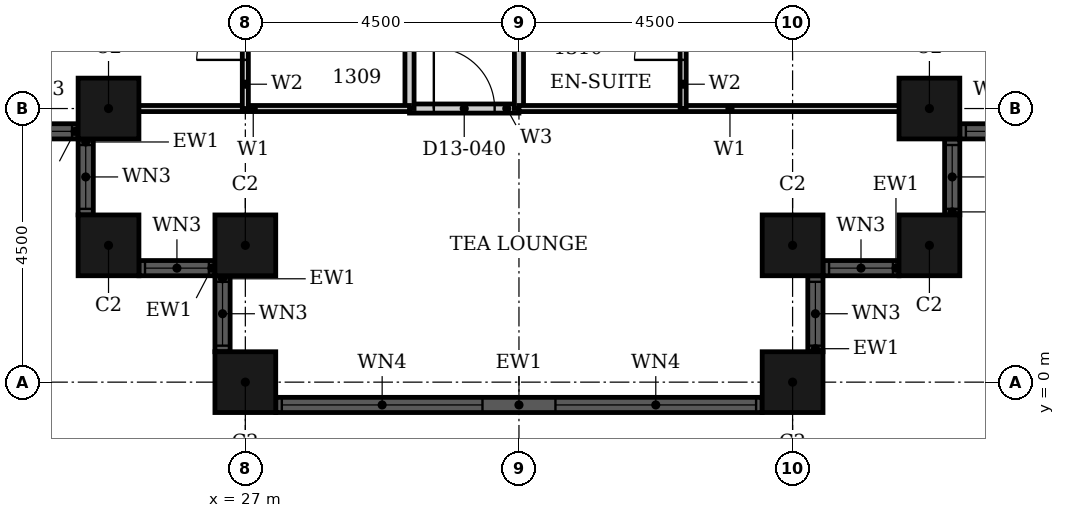
"""IFC4 building model, lengths in metres.
Left out: names, types, materials, properties, quantities, classifications, styles, units other than length and angle.
Written with IfcOpenShell. Run it as: python <this file> out.ifc"""

import sys

from ifc_helpers import new_model, si_unit, direction, frame, frame_2d, origin, origin_2d, place, context, subcontext, project, spatial, rectangle, hollow_rectangle, extrude, element, fill, save


model = new_model("IFC4")
c1 = context("Model", 3, precision=1e-05, world=origin(), true_north=direction((0.0, 1.0)))
c2 = subcontext(c1, "Body", "Model", "MODEL_VIEW")
j1 = project(units=[si_unit("LENGTHUNIT", "METRE"), si_unit("PLANEANGLEUNIT", "RADIAN")], contexts=[c1])
p1 = place(None, origin())
s1 = spatial("IfcSite", under=j1, at=p1, CompositionType="ELEMENT")
p2 = place(p1, origin())
s2 = spatial("IfcBuilding", under=s1, at=p2, CompositionType="ELEMENT")
p3 = place(p2, frame((0.0, 0.0, 60.0)))
s3 = spatial("IfcBuildingStorey", under=s2, at=p3, CompositionType="ELEMENT", Elevation=60.0)
for number, where, z_axis, x_axis in (
    (1, (24.75, 4.5, 0.0), (0.0, 0.0, 1.0), (1.0, 0.0, 0.0)),
    (2, (24.75, 2.25, 0.0), (0.0, 0.0, 1.0), (1.0, 0.0, 0.0)),
    (3, (27.0, 2.25, 0.0), (0.0, 0.0, 1.0), (1.0, 0.0, 0.0)),
    (4, (27.0, 0.0, 0.0), (0.0, 0.0, 1.0), (1.0, 0.0, 0.0)),
    (5, (36.0, 0.0, 0.0), (0.0, 0.0, 1.0), (1.0, 0.0, 0.0)),
    (6, (36.0, 2.25, 0.0), (0.0, 0.0, 1.0), (1.0, 0.0, 0.0)),
    (7, (38.25, 2.25, 0.0), (0.0, 0.0, 1.0), (1.0, 0.0, 0.0)),
    (8, (38.25, 4.5, 0.0), (0.0, 0.0, 1.0), (1.0, 0.0, 0.0)),
):
    element("IfcColumn", number, at=place(p3, frame(where, z_axis=z_axis, x_axis=x_axis)), inside=s3, PredefinedType="COLUMN", context=c2, shape_type="SweptSolid", body=[
        extrude(hollow_rectangle(XDim=1.0, YDim=1.0, WallThickness=0.032, at=origin_2d()), origin(), (0.0, 0.0, 1.0), 3.6),
    ])
p4 = place(p3, frame((23.0, 4.125, 0.0), z_axis=(0.0, 0.0, 1.0), x_axis=(1.0, 0.0, 0.0)))
e9 = element("IfcWall", 9, at=p4, inside=s3, PredefinedType="SOLIDWALL", context=c2, shape_type="SweptSolid", body=[
    extrude(rectangle(XDim=1.25, YDim=0.25, at=frame_2d((0.625, 0.0))), origin(), (0.0, 0.0, 1.0), 3.6),
])
p5 = place(p4, frame((0.1, 0.0, 0.9)))
e10 = element("IfcOpeningElement", 10, at=p5, cuts=e9, PredefinedType="OPENING", context=c2, shape_type="SweptSolid", body=[
    extrude(rectangle(XDim=1.05, YDim=2.08, at=frame_2d((0.525, 1.04))), frame((0.0, 0.135, 0.0), z_axis=(0.0, -1.0, 0.0), x_axis=(1.0, 0.0, 0.0)), (0.0, 0.0, 1.0), 0.27),
])
p6 = place(p3, frame((24.375, 4.0, 0.0), z_axis=(0.0, 0.0, 1.0), x_axis=(0.0, -1.0, 0.0)))
e11 = element("IfcWall", 11, at=p6, inside=s3, PredefinedType="SOLIDWALL", context=c2, shape_type="SweptSolid", body=[
    extrude(rectangle(XDim=1.25, YDim=0.25, at=frame_2d((0.625, 0.0))), origin(), (0.0, 0.0, 1.0), 3.6),
])
p7 = place(p6, frame((0.1, 0.0, 0.9)))
e12 = element("IfcOpeningElement", 12, at=p7, cuts=e11, PredefinedType="OPENING", context=c2, shape_type="SweptSolid", body=[
    extrude(rectangle(XDim=1.05, YDim=2.08, at=frame_2d((0.525, 1.04))), frame((0.0, 0.135, 0.0), z_axis=(0.0, -1.0, 0.0), x_axis=(1.0, 0.0, 0.0)), (0.0, 0.0, 1.0), 0.27),
])
p8 = place(p3, frame((25.25, 1.875, 0.0), z_axis=(0.0, 0.0, 1.0), x_axis=(1.0, 0.0, 0.0)))
e13 = element("IfcWall", 13, at=p8, inside=s3, PredefinedType="SOLIDWALL", context=c2, shape_type="SweptSolid", body=[
    extrude(rectangle(XDim=1.25, YDim=0.25, at=frame_2d((0.625, 0.0))), origin(), (0.0, 0.0, 1.0), 3.6),
])
p9 = place(p8, frame((0.1, 0.0, 0.9)))
e14 = element("IfcOpeningElement", 14, at=p9, cuts=e13, PredefinedType="OPENING", context=c2, shape_type="SweptSolid", body=[
    extrude(rectangle(XDim=1.05, YDim=2.08, at=frame_2d((0.525, 1.04))), frame((0.0, 0.135, 0.0), z_axis=(0.0, -1.0, 0.0), x_axis=(1.0, 0.0, 0.0)), (0.0, 0.0, 1.0), 0.27),
])
p10 = place(p3, frame((26.625, 1.75, 0.0), z_axis=(0.0, 0.0, 1.0), x_axis=(0.0, -1.0, 0.0)))
e15 = element("IfcWall", 15, at=p10, inside=s3, PredefinedType="SOLIDWALL", context=c2, shape_type="SweptSolid", body=[
    extrude(rectangle(XDim=1.25, YDim=0.25, at=frame_2d((0.625, 0.0))), origin(), (0.0, 0.0, 1.0), 3.6),
])
p11 = place(p10, frame((0.1, 0.0, 0.9)))
e16 = element("IfcOpeningElement", 16, at=p11, cuts=e15, PredefinedType="OPENING", context=c2, shape_type="SweptSolid", body=[
    extrude(rectangle(XDim=1.05, YDim=2.08, at=frame_2d((0.525, 1.04))), frame((0.0, 0.135, 0.0), z_axis=(0.0, -1.0, 0.0), x_axis=(1.0, 0.0, 0.0)), (0.0, 0.0, 1.0), 0.27),
])
p12 = place(p3, frame((27.5, -0.375, 0.0), z_axis=(0.0, 0.0, 1.0), x_axis=(1.0, 0.0, 0.0)))
e17 = element("IfcWall", 17, at=p12, inside=s3, PredefinedType="SOLIDWALL", context=c2, shape_type="SweptSolid", body=[
    extrude(rectangle(XDim=8.0, YDim=0.25, at=frame_2d((4.0, 0.0))), origin(), (0.0, 0.0, 1.0), 3.6),
])
p13 = place(p12, frame((0.1, 0.0, 0.9)))
e18 = element("IfcOpeningElement", 18, at=p13, cuts=e17, PredefinedType="OPENING", context=c2, shape_type="SweptSolid", body=[
    extrude(rectangle(XDim=3.3, YDim=2.08, at=frame_2d((1.65, 1.04))), frame((0.0, 0.135, 0.0), z_axis=(0.0, -1.0, 0.0), x_axis=(1.0, 0.0, 0.0)), (0.0, 0.0, 1.0), 0.27),
])
p14 = place(p12, frame((4.6, 0.0, 0.9)))
e19 = element("IfcOpeningElement", 19, at=p14, cuts=e17, PredefinedType="OPENING", context=c2, shape_type="SweptSolid", body=[
    extrude(rectangle(XDim=3.3, YDim=2.08, at=frame_2d((1.65, 1.04))), frame((0.0, 0.135, 0.0), z_axis=(0.0, -1.0, 0.0), x_axis=(1.0, 0.0, 0.0)), (0.0, 0.0, 1.0), 0.27),
])
p15 = place(p3, frame((36.375, 0.5, 0.0), z_axis=(0.0, 0.0, 1.0), x_axis=(0.0, 1.0, 0.0)))
e20 = element("IfcWall", 20, at=p15, inside=s3, PredefinedType="SOLIDWALL", context=c2, shape_type="SweptSolid", body=[
    extrude(rectangle(XDim=1.25, YDim=0.25, at=frame_2d((0.625, 0.0))), origin(), (0.0, 0.0, 1.0), 3.6),
])
p16 = place(p15, frame((0.1, 0.0, 0.9)))
e21 = element("IfcOpeningElement", 21, at=p16, cuts=e20, PredefinedType="OPENING", context=c2, shape_type="SweptSolid", body=[
    extrude(rectangle(XDim=1.05, YDim=2.08, at=frame_2d((0.525, 1.04))), frame((0.0, 0.135, 0.0), z_axis=(0.0, -1.0, 0.0), x_axis=(1.0, 0.0, 0.0)), (0.0, 0.0, 1.0), 0.27),
])
p17 = place(p3, frame((36.5, 1.875, 0.0), z_axis=(0.0, 0.0, 1.0), x_axis=(1.0, 0.0, 0.0)))
e22 = element("IfcWall", 22, at=p17, inside=s3, PredefinedType="SOLIDWALL", context=c2, shape_type="SweptSolid", body=[
    extrude(rectangle(XDim=1.25, YDim=0.25, at=frame_2d((0.625, 0.0))), origin(), (0.0, 0.0, 1.0), 3.6),
])
p18 = place(p17, frame((0.1, 0.0, 0.9)))
e23 = element("IfcOpeningElement", 23, at=p18, cuts=e22, PredefinedType="OPENING", context=c2, shape_type="SweptSolid", body=[
    extrude(rectangle(XDim=1.05, YDim=2.08, at=frame_2d((0.525, 1.04))), frame((0.0, 0.135, 0.0), z_axis=(0.0, -1.0, 0.0), x_axis=(1.0, 0.0, 0.0)), (0.0, 0.0, 1.0), 0.27),
])
p19 = place(p3, frame((38.625, 2.75, 0.0), z_axis=(0.0, 0.0, 1.0), x_axis=(0.0, 1.0, 0.0)))
e24 = element("IfcWall", 24, at=p19, inside=s3, PredefinedType="SOLIDWALL", context=c2, shape_type="SweptSolid", body=[
    extrude(rectangle(XDim=1.25, YDim=0.25, at=frame_2d((0.625, 0.0))), origin(), (0.0, 0.0, 1.0), 3.6),
])
p20 = place(p19, frame((0.1, 0.0, 0.9)))
e25 = element("IfcOpeningElement", 25, at=p20, cuts=e24, PredefinedType="OPENING", context=c2, shape_type="SweptSolid", body=[
    extrude(rectangle(XDim=1.05, YDim=2.08, at=frame_2d((0.525, 1.04))), frame((0.0, 0.135, 0.0), z_axis=(0.0, -1.0, 0.0), x_axis=(1.0, 0.0, 0.0)), (0.0, 0.0, 1.0), 0.27),
])
p21 = place(p3, frame((38.75, 4.125, 0.0), z_axis=(0.0, 0.0, 1.0), x_axis=(1.0, 0.0, 0.0)))
e26 = element("IfcWall", 26, at=p21, inside=s3, PredefinedType="SOLIDWALL", context=c2, shape_type="SweptSolid", body=[
    extrude(rectangle(XDim=1.25, YDim=0.25, at=frame_2d((0.625, 0.0))), origin(), (0.0, 0.0, 1.0), 3.6),
])
p22 = place(p21, frame((0.1, 0.0, 0.9)))
e27 = element("IfcOpeningElement", 27, at=p22, cuts=e26, PredefinedType="OPENING", context=c2, shape_type="SweptSolid", body=[
    extrude(rectangle(XDim=1.05, YDim=2.08, at=frame_2d((0.525, 1.04))), frame((0.0, 0.135, 0.0), z_axis=(0.0, -1.0, 0.0), x_axis=(1.0, 0.0, 0.0)), (0.0, 0.0, 1.0), 0.27),
])
p23 = place(p3, frame((29.7, 4.5, 0.0), z_axis=(0.0, 0.0, 1.0), x_axis=(1.0, 0.0, 0.0)))
e28 = element("IfcWall", 28, at=p23, inside=s3, PredefinedType="PARTITIONING", context=c2, shape_type="SweptSolid", body=[
    extrude(rectangle(XDim=1.8, YDim=0.15, at=frame_2d((0.9, 0.0))), origin(), (0.0, 0.0, 1.0), 3.3),
])
p24 = place(p23, frame((0.4, 0.0, 0.0)))
e29 = element("IfcOpeningElement", 29, at=p24, cuts=e28, PredefinedType="OPENING", context=c2, shape_type="SweptSolid", body=[
    extrude(rectangle(XDim=1.0, YDim=2.1, at=frame_2d((0.5, 1.05))), frame((0.0, 0.085, 0.0), z_axis=(0.0, -1.0, 0.0), x_axis=(1.0, 0.0, 0.0)), (0.0, 0.0, 1.0), 0.17),
])
p25 = place(p3, frame((29.7, 4.5, 0.0), z_axis=(0.0, 0.0, 1.0), x_axis=(0.0, 1.0, 0.0)))
e30 = element("IfcWall", 30, at=p25, inside=s3, PredefinedType="PARTITIONING", context=c2, shape_type="SweptSolid", body=[
    extrude(rectangle(XDim=16.2, YDim=0.15, at=frame_2d((8.1, 0.0))), origin(), (0.0, 0.0, 1.0), 3.3),
])
p26 = place(p25, frame((7.45, 0.0, 0.0)))
e31 = element("IfcOpeningElement", 31, at=p26, cuts=e30, PredefinedType="OPENING", context=c2, shape_type="SweptSolid", body=[
    extrude(rectangle(XDim=1.0, YDim=2.1, at=frame_2d((0.5, 1.05))), frame((0.0, 0.085, 0.0), z_axis=(0.0, -1.0, 0.0), x_axis=(1.0, 0.0, 0.0)), (0.0, 0.0, 1.0), 0.17),
])
p27 = place(p25, frame((2.95, 0.0, 0.0)))
e32 = element("IfcOpeningElement", 32, at=p27, cuts=e30, PredefinedType="OPENING", context=c2, shape_type="SweptSolid", body=[
    extrude(rectangle(XDim=1.0, YDim=2.1, at=frame_2d((0.5, 1.05))), frame((0.0, 0.085, 0.0), z_axis=(0.0, -1.0, 0.0), x_axis=(1.0, 0.0, 0.0)), (0.0, 0.0, 1.0), 0.17),
])
p28 = place(p3, frame((31.5, 4.5, 0.0), z_axis=(0.0, 0.0, 1.0), x_axis=(0.0, 1.0, 0.0)))
e33 = element("IfcWall", 33, at=p28, inside=s3, PredefinedType="PARTITIONING", context=c2, shape_type="SweptSolid", body=[
    extrude(rectangle(XDim=16.2, YDim=0.15, at=frame_2d((8.1, 0.0))), origin(), (0.0, 0.0, 1.0), 2.58),
])
p29 = place(p28, frame((6.25, 0.0, 0.0)))
e34 = element("IfcOpeningElement", 34, at=p29, cuts=e33, PredefinedType="OPENING", context=c2, shape_type="SweptSolid", body=[
    extrude(rectangle(XDim=1.0, YDim=2.1, at=frame_2d((0.5, 1.05))), frame((0.0, 0.085, 0.0), z_axis=(0.0, -1.0, 0.0), x_axis=(1.0, 0.0, 0.0)), (0.0, 0.0, 1.0), 0.17),
])
p30 = place(p3, frame((24.56, 4.5, 0.0), z_axis=(0.0, 0.0, 1.0), x_axis=(1.0, 0.0, 0.0)))
e35 = element("IfcWall", 35, at=p30, inside=s3, PredefinedType="PARTITIONING", context=c2, shape_type="SweptSolid", body=[
    extrude(rectangle(XDim=5.14, YDim=0.1, at=frame_2d((2.57, 0.0))), origin(), (0.0, 0.0, 1.0), 3.3),
])
p31 = place(p3, frame((31.5, 4.5, 0.0), z_axis=(0.0, 0.0, 1.0), x_axis=(1.0, 0.0, 0.0)))
e36 = element("IfcWall", 36, at=p31, inside=s3, PredefinedType="PARTITIONING", context=c2, shape_type="SweptSolid", body=[
    extrude(rectangle(XDim=6.94, YDim=0.1, at=frame_2d((3.47, 0.0))), origin(), (0.0, 0.0, 1.0), 3.3),
])
p32 = place(p3, frame((27.0, 4.5, 0.0), z_axis=(0.0, 0.0, 1.0), x_axis=(0.0, 1.0, 0.0)))
e37 = element("IfcWall", 37, at=p32, inside=s3, PredefinedType="PARTITIONING", context=c2, shape_type="SweptSolid", body=[
    extrude(rectangle(XDim=2.4, YDim=0.1, at=frame_2d((1.2, 0.0))), origin(), (0.0, 0.0, 1.0), 2.58),
])
p33 = place(p32, frame((0.8, 0.0, 0.0)))
e38 = element("IfcOpeningElement", 38, at=p33, cuts=e37, PredefinedType="OPENING", context=c2, shape_type="SweptSolid", body=[
    extrude(rectangle(XDim=0.8, YDim=2.1, at=frame_2d((0.4, 1.05))), frame((0.0, 0.06, 0.0), z_axis=(0.0, -1.0, 0.0), x_axis=(1.0, 0.0, 0.0)), (0.0, 0.0, 1.0), 0.12),
])
p34 = place(p3, frame((34.2, 4.5, 0.0), z_axis=(0.0, 0.0, 1.0), x_axis=(0.0, 1.0, 0.0)))
e39 = element("IfcWall", 39, at=p34, inside=s3, PredefinedType="PARTITIONING", context=c2, shape_type="SweptSolid", body=[
    extrude(rectangle(XDim=2.4, YDim=0.1, at=frame_2d((1.2, 0.0))), origin(), (0.0, 0.0, 1.0), 3.3),
])
p35 = place(p34, frame((0.8, 0.0, 0.0)))
e40 = element("IfcOpeningElement", 40, at=p35, cuts=e39, PredefinedType="OPENING", context=c2, shape_type="SweptSolid", body=[
    extrude(rectangle(XDim=0.8, YDim=2.1, at=frame_2d((0.4, 1.05))), frame((0.0, 0.06, 0.0), z_axis=(0.0, -1.0, 0.0), x_axis=(1.0, 0.0, 0.0)), (0.0, 0.0, 1.0), 0.12),
])
p36 = place(p5, origin())
e41 = element("IfcWindow", 41, at=p36, inside=s3, PartitioningType="SINGLE_PANEL", PredefinedType="WINDOW", context=c2, shape_type="SweptSolid", body=[
    extrude(rectangle(XDim=1.05, YDim=2.08, at=frame_2d((0.525, 1.04))), frame((0.0, 0.03, 0.0), z_axis=(0.0, -1.0, 0.0), x_axis=(1.0, 0.0, 0.0)), (0.0, 0.0, 1.0), 0.06),
])
fill(e10, e41)
p37 = place(p7, origin())
e42 = element("IfcWindow", 42, at=p37, inside=s3, PartitioningType="SINGLE_PANEL", PredefinedType="WINDOW", context=c2, shape_type="SweptSolid", body=[
    extrude(rectangle(XDim=1.05, YDim=2.08, at=frame_2d((0.525, 1.04))), frame((0.0, 0.03, 0.0), z_axis=(0.0, -1.0, 0.0), x_axis=(1.0, 0.0, 0.0)), (0.0, 0.0, 1.0), 0.06),
])
fill(e12, e42)
p38 = place(p9, origin())
e43 = element("IfcWindow", 43, at=p38, inside=s3, PartitioningType="SINGLE_PANEL", PredefinedType="WINDOW", context=c2, shape_type="SweptSolid", body=[
    extrude(rectangle(XDim=1.05, YDim=2.08, at=frame_2d((0.525, 1.04))), frame((0.0, 0.03, 0.0), z_axis=(0.0, -1.0, 0.0), x_axis=(1.0, 0.0, 0.0)), (0.0, 0.0, 1.0), 0.06),
])
fill(e14, e43)
p39 = place(p11, origin())
e44 = element("IfcWindow", 44, at=p39, inside=s3, PartitioningType="SINGLE_PANEL", PredefinedType="WINDOW", context=c2, shape_type="SweptSolid", body=[
    extrude(rectangle(XDim=1.05, YDim=2.08, at=frame_2d((0.525, 1.04))), frame((0.0, 0.03, 0.0), z_axis=(0.0, -1.0, 0.0), x_axis=(1.0, 0.0, 0.0)), (0.0, 0.0, 1.0), 0.06),
])
fill(e16, e44)
p40 = place(p13, origin())
e45 = element("IfcWindow", 45, at=p40, inside=s3, PartitioningType="SINGLE_PANEL", PredefinedType="WINDOW", context=c2, shape_type="SweptSolid", body=[
    extrude(rectangle(XDim=3.3, YDim=2.08, at=frame_2d((1.65, 1.04))), frame((0.0, 0.03, 0.0), z_axis=(0.0, -1.0, 0.0), x_axis=(1.0, 0.0, 0.0)), (0.0, 0.0, 1.0), 0.06),
])
fill(e18, e45)
p41 = place(p14, origin())
e46 = element("IfcWindow", 46, at=p41, inside=s3, PartitioningType="SINGLE_PANEL", PredefinedType="WINDOW", context=c2, shape_type="SweptSolid", body=[
    extrude(rectangle(XDim=3.3, YDim=2.08, at=frame_2d((1.65, 1.04))), frame((0.0, 0.03, 0.0), z_axis=(0.0, -1.0, 0.0), x_axis=(1.0, 0.0, 0.0)), (0.0, 0.0, 1.0), 0.06),
])
fill(e19, e46)
p42 = place(p16, origin())
e47 = element("IfcWindow", 47, at=p42, inside=s3, PartitioningType="SINGLE_PANEL", PredefinedType="WINDOW", context=c2, shape_type="SweptSolid", body=[
    extrude(rectangle(XDim=1.05, YDim=2.08, at=frame_2d((0.525, 1.04))), frame((0.0, 0.03, 0.0), z_axis=(0.0, -1.0, 0.0), x_axis=(1.0, 0.0, 0.0)), (0.0, 0.0, 1.0), 0.06),
])
fill(e21, e47)
p43 = place(p18, origin())
e48 = element("IfcWindow", 48, at=p43, inside=s3, PartitioningType="SINGLE_PANEL", PredefinedType="WINDOW", context=c2, shape_type="SweptSolid", body=[
    extrude(rectangle(XDim=1.05, YDim=2.08, at=frame_2d((0.525, 1.04))), frame((0.0, 0.03, 0.0), z_axis=(0.0, -1.0, 0.0), x_axis=(1.0, 0.0, 0.0)), (0.0, 0.0, 1.0), 0.06),
])
fill(e23, e48)
p44 = place(p20, origin())
e49 = element("IfcWindow", 49, at=p44, inside=s3, PartitioningType="SINGLE_PANEL", PredefinedType="WINDOW", context=c2, shape_type="SweptSolid", body=[
    extrude(rectangle(XDim=1.05, YDim=2.08, at=frame_2d((0.525, 1.04))), frame((0.0, 0.03, 0.0), z_axis=(0.0, -1.0, 0.0), x_axis=(1.0, 0.0, 0.0)), (0.0, 0.0, 1.0), 0.06),
])
fill(e25, e49)
p45 = place(p22, origin())
e50 = element("IfcWindow", 50, at=p45, inside=s3, PartitioningType="SINGLE_PANEL", PredefinedType="WINDOW", context=c2, shape_type="SweptSolid", body=[
    extrude(rectangle(XDim=1.05, YDim=2.08, at=frame_2d((0.525, 1.04))), frame((0.0, 0.03, 0.0), z_axis=(0.0, -1.0, 0.0), x_axis=(1.0, 0.0, 0.0)), (0.0, 0.0, 1.0), 0.06),
])
fill(e27, e50)
p46 = place(p33, origin())
e51 = element("IfcDoor", 51, at=p46, inside=s3, OperationType="SINGLE_SWING_LEFT", PredefinedType="DOOR", context=c2, shape_type="SweptSolid", body=[
    extrude(rectangle(XDim=0.8, YDim=2.1, at=frame_2d((0.4, 1.05))), frame((0.0, 0.025, 0.0), z_axis=(0.0, -1.0, 0.0), x_axis=(1.0, 0.0, 0.0)), (0.0, 0.0, 1.0), 0.05),
])
fill(e38, e51)
p47 = place(p35, origin())
e52 = element("IfcDoor", 52, at=p47, inside=s3, OperationType="SINGLE_SWING_LEFT", PredefinedType="DOOR", context=c2, shape_type="SweptSolid", body=[
    extrude(rectangle(XDim=0.8, YDim=2.1, at=frame_2d((0.4, 1.05))), frame((0.0, 0.025, 0.0), z_axis=(0.0, -1.0, 0.0), x_axis=(1.0, 0.0, 0.0)), (0.0, 0.0, 1.0), 0.05),
])
fill(e40, e52)
p48 = place(p24, origin())
e53 = element("IfcDoor", 53, at=p48, inside=s3, OperationType="SINGLE_SWING_LEFT", PredefinedType="DOOR", context=c2, shape_type="SweptSolid", body=[
    extrude(rectangle(XDim=1.0, YDim=2.1, at=frame_2d((0.5, 1.05))), frame((0.0, 0.025, 0.0), z_axis=(0.0, -1.0, 0.0), x_axis=(1.0, 0.0, 0.0)), (0.0, 0.0, 1.0), 0.05),
])
fill(e29, e53)
save(model, sys.argv[1])
